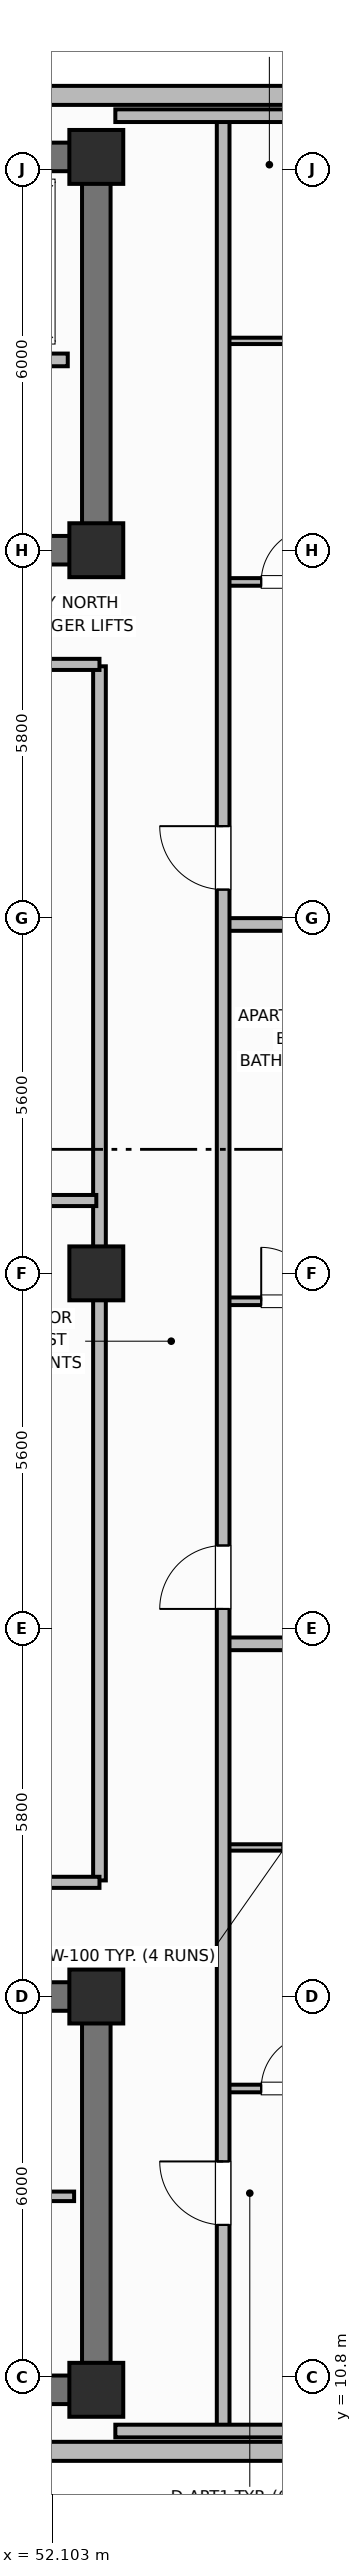
"""IFC4 building model, lengths in metres.
Left out: names, types, materials, properties, quantities, classifications, styles, units other than length and angle.
Written with IfcOpenShell. Run it as: python <this file> out.ifc"""

import sys

from ifc_helpers import new_model, si_unit, direction, frame, frame_2d, origin, origin_2d, place, context, subcontext, project, spatial, rectangle, extrude, element, fill, save


model = new_model("IFC4")
c1 = context("Model", 3, precision=1e-05, world=origin(), true_north=direction((0.0, 1.0)))
c2 = subcontext(c1, "Body", "Model", "MODEL_VIEW")
j1 = project(units=[si_unit("LENGTHUNIT", "METRE"), si_unit("PLANEANGLEUNIT", "RADIAN")], contexts=[c1])
p1 = place(None, origin())
s1 = spatial("IfcSite", under=j1, at=p1, CompositionType="ELEMENT")
p2 = place(p1, origin())
s2 = spatial("IfcBuilding", under=s1, at=p2, CompositionType="ELEMENT")
p3 = place(p2, frame((0.0, 0.0, 236.9)))
s3 = spatial("IfcBuildingStorey", under=s2, at=p3, CompositionType="ELEMENT", Elevation=236.9)
p4 = place(p3, frame((52.8, 10.6, 0.0), z_axis=(0.0, 0.0, 1.0), x_axis=(-1.0, 0.0, 0.0)))
e1 = element("IfcWall", 1, at=p4, inside=s3, PredefinedType="SHEAR", context=c2, shape_type="SweptSolid", body=[
    extrude(rectangle(XDim=27.2, YDim=0.45, at=frame_2d((13.6, 0.0))), origin(), (0.0, 0.0, 1.0), 3.7),
])
p5 = place(p3, frame((52.8, 10.825, 0.0), z_axis=(0.0, 0.0, 1.0), x_axis=(0.0, 1.0, 0.0)))
e2 = element("IfcWall", 2, at=p5, inside=s3, PredefinedType="SHEAR", context=c2, shape_type="SweptSolid", body=[
    extrude(rectangle(XDim=5.75, YDim=0.45, at=frame_2d((2.875, 0.0))), origin(), (0.0, 0.0, 1.0), 3.7),
])
p6 = place(p3, frame((25.6, 16.8, 0.0), z_axis=(0.0, 0.0, 1.0), x_axis=(1.0, 0.0, 0.0)))
e3 = element("IfcWall", 3, at=p6, inside=s3, PredefinedType="SHEAR", context=c2, shape_type="SweptSolid", body=[
    extrude(rectangle(XDim=27.2, YDim=0.45, at=frame_2d((13.6, 0.0))), origin(), (0.0, 0.0, 1.0), 3.7),
])
p7 = place(p6, frame((1.7, 0.0, 0.0)))
e4 = element("IfcOpeningElement", 4, at=p7, cuts=e3, PredefinedType="OPENING", context=c2, shape_type="SweptSolid", body=[
    extrude(rectangle(XDim=1.1, YDim=2.15, at=frame_2d((0.55, 1.075))), frame((0.0, 0.235, 0.0), z_axis=(0.0, -1.0, 0.0), x_axis=(1.0, 0.0, 0.0)), (0.0, 0.0, 1.0), 0.47),
])
p8 = place(p6, frame((4.45, 0.0, 0.0)))
e5 = element("IfcOpeningElement", 5, at=p8, cuts=e3, PredefinedType="OPENING", context=c2, shape_type="SweptSolid", body=[
    extrude(rectangle(XDim=0.85, YDim=2.1, at=frame_2d((0.425, 1.05))), frame((0.0, 0.235, 0.0), z_axis=(0.0, -1.0, 0.0), x_axis=(1.0, 0.0, 0.0)), (0.0, 0.0, 1.0), 0.47),
])
p9 = place(p6, frame((6.5, 0.0, 0.0)))
e6 = element("IfcOpeningElement", 6, at=p9, cuts=e3, PredefinedType="OPENING", context=c2, shape_type="SweptSolid", body=[
    extrude(rectangle(XDim=0.85, YDim=2.1, at=frame_2d((0.425, 1.05))), frame((0.0, 0.235, 0.0), z_axis=(0.0, -1.0, 0.0), x_axis=(1.0, 0.0, 0.0)), (0.0, 0.0, 1.0), 0.47),
])
p10 = place(p6, frame((13.0, 0.0, 0.0)))
e7 = element("IfcOpeningElement", 7, at=p10, cuts=e3, PredefinedType="OPENING", context=c2, shape_type="SweptSolid", body=[
    extrude(rectangle(XDim=1.2, YDim=2.15, at=frame_2d((0.6, 1.075))), frame((0.0, 0.235, 0.0), z_axis=(0.0, -1.0, 0.0), x_axis=(1.0, 0.0, 0.0)), (0.0, 0.0, 1.0), 0.47),
])
p11 = place(p6, frame((19.8, 0.0, 0.0)))
e8 = element("IfcOpeningElement", 8, at=p11, cuts=e3, PredefinedType="OPENING", context=c2, shape_type="SweptSolid", body=[
    extrude(rectangle(XDim=0.85, YDim=2.1, at=frame_2d((0.425, 1.05))), frame((0.0, 0.235, 0.0), z_axis=(0.0, -1.0, 0.0), x_axis=(1.0, 0.0, 0.0)), (0.0, 0.0, 1.0), 0.47),
])
p12 = place(p6, frame((24.2, 0.0, 0.0)))
e9 = element("IfcOpeningElement", 9, at=p12, cuts=e3, PredefinedType="OPENING", context=c2, shape_type="SweptSolid", body=[
    extrude(rectangle(XDim=0.85, YDim=2.1, at=frame_2d((0.425, 1.05))), frame((0.0, 0.235, 0.0), z_axis=(0.0, -1.0, 0.0), x_axis=(1.0, 0.0, 0.0)), (0.0, 0.0, 1.0), 0.47),
])
p13 = place(p3, frame((25.6, 45.8, 0.0), z_axis=(0.0, 0.0, 1.0), x_axis=(1.0, 0.0, 0.0)))
e10 = element("IfcWall", 10, at=p13, inside=s3, PredefinedType="SHEAR", context=c2, shape_type="SweptSolid", body=[
    extrude(rectangle(XDim=27.2, YDim=0.45, at=frame_2d((13.6, 0.0))), origin(), (0.0, 0.0, 1.0), 3.7),
])
p14 = place(p3, frame((52.8, 39.825, 0.0), z_axis=(0.0, 0.0, 1.0), x_axis=(0.0, 1.0, 0.0)))
e11 = element("IfcWall", 11, at=p14, inside=s3, PredefinedType="SHEAR", context=c2, shape_type="SweptSolid", body=[
    extrude(rectangle(XDim=5.75, YDim=0.45, at=frame_2d((2.875, 0.0))), origin(), (0.0, 0.0, 1.0), 3.7),
])
p15 = place(p3, frame((52.8, 39.6, 0.0), z_axis=(0.0, 0.0, 1.0), x_axis=(-1.0, 0.0, 0.0)))
e12 = element("IfcWall", 12, at=p15, inside=s3, PredefinedType="SHEAR", context=c2, shape_type="SweptSolid", body=[
    extrude(rectangle(XDim=27.2, YDim=0.45, at=frame_2d((13.6, 0.0))), origin(), (0.0, 0.0, 1.0), 3.7),
])
p16 = place(p15, frame((24.3, 0.0, 0.0)))
e13 = element("IfcOpeningElement", 13, at=p16, cuts=e12, PredefinedType="OPENING", context=c2, shape_type="SweptSolid", body=[
    extrude(rectangle(XDim=1.1, YDim=2.15, at=frame_2d((0.55, 1.075))), frame((0.0, 0.235, 0.0), z_axis=(0.0, -1.0, 0.0), x_axis=(1.0, 0.0, 0.0)), (0.0, 0.0, 1.0), 0.47),
])
p17 = place(p15, frame((21.85, 0.0, 0.0)))
e14 = element("IfcOpeningElement", 14, at=p17, cuts=e12, PredefinedType="OPENING", context=c2, shape_type="SweptSolid", body=[
    extrude(rectangle(XDim=0.85, YDim=2.1, at=frame_2d((0.425, 1.05))), frame((0.0, 0.235, 0.0), z_axis=(0.0, -1.0, 0.0), x_axis=(1.0, 0.0, 0.0)), (0.0, 0.0, 1.0), 0.47),
])
p18 = place(p15, frame((19.85, 0.0, 0.0)))
e15 = element("IfcOpeningElement", 15, at=p18, cuts=e12, PredefinedType="OPENING", context=c2, shape_type="SweptSolid", body=[
    extrude(rectangle(XDim=0.85, YDim=2.1, at=frame_2d((0.425, 1.05))), frame((0.0, 0.235, 0.0), z_axis=(0.0, -1.0, 0.0), x_axis=(1.0, 0.0, 0.0)), (0.0, 0.0, 1.0), 0.47),
])
p19 = place(p15, frame((15.1, 0.0, 0.0)))
e16 = element("IfcOpeningElement", 16, at=p19, cuts=e12, PredefinedType="OPENING", context=c2, shape_type="SweptSolid", body=[
    extrude(rectangle(XDim=1.2, YDim=2.15, at=frame_2d((0.6, 1.075))), frame((0.0, 0.235, 0.0), z_axis=(0.0, -1.0, 0.0), x_axis=(1.0, 0.0, 0.0)), (0.0, 0.0, 1.0), 0.47),
])
p20 = place(p15, frame((12.6, 0.0, 0.0)))
e17 = element("IfcOpeningElement", 17, at=p20, cuts=e12, PredefinedType="OPENING", context=c2, shape_type="SweptSolid", body=[
    extrude(rectangle(XDim=0.85, YDim=2.1, at=frame_2d((0.425, 1.05))), frame((0.0, 0.235, 0.0), z_axis=(0.0, -1.0, 0.0), x_axis=(1.0, 0.0, 0.0)), (0.0, 0.0, 1.0), 0.47),
])
p21 = place(p15, frame((10.85, 0.0, 0.0)))
e18 = element("IfcOpeningElement", 18, at=p21, cuts=e12, PredefinedType="OPENING", context=c2, shape_type="SweptSolid", body=[
    extrude(rectangle(XDim=0.85, YDim=2.1, at=frame_2d((0.425, 1.05))), frame((0.0, 0.235, 0.0), z_axis=(0.0, -1.0, 0.0), x_axis=(1.0, 0.0, 0.0)), (0.0, 0.0, 1.0), 0.47),
])
p22 = place(p15, frame((7.35, 0.0, 0.0)))
e19 = element("IfcOpeningElement", 19, at=p22, cuts=e12, PredefinedType="OPENING", context=c2, shape_type="SweptSolid", body=[
    extrude(rectangle(XDim=0.85, YDim=2.1, at=frame_2d((0.425, 1.05))), frame((0.0, 0.235, 0.0), z_axis=(0.0, -1.0, 0.0), x_axis=(1.0, 0.0, 0.0)), (0.0, 0.0, 1.0), 0.47),
])
p23 = place(p15, frame((4.2, 0.0, 0.0)))
e20 = element("IfcOpeningElement", 20, at=p23, cuts=e12, PredefinedType="OPENING", context=c2, shape_type="SweptSolid", body=[
    extrude(rectangle(XDim=1.3, YDim=2.2, at=frame_2d((0.65, 1.1))), frame((0.0, 0.235, 0.0), z_axis=(0.0, -1.0, 0.0), x_axis=(1.0, 0.0, 0.0)), (0.0, 0.0, 1.0), 0.47),
])
for number, where, z_axis, x_axis in (
    (21, (52.8, 10.6, 0.0), (0.0, 0.0, 1.0), (1.0, 0.0, 0.0)),
    (22, (52.8, 16.8, 0.0), (0.0, 0.0, 1.0), (1.0, 0.0, 0.0)),
    (23, (52.8, 39.6, 0.0), (0.0, 0.0, 1.0), (1.0, 0.0, 0.0)),
    (24, (52.8, 45.8, 0.0), (0.0, 0.0, 1.0), (1.0, 0.0, 0.0)),
    (25, (52.8, 28.2, 0.0), (0.0, 0.0, 1.0), (1.0, 0.0, 0.0)),
):
    element("IfcColumn", number, at=place(p3, frame(where, z_axis=z_axis, x_axis=x_axis)), inside=s3, PredefinedType="COLUMN", context=c2, shape_type="SweptSolid", body=[
        extrude(rectangle(XDim=0.85, YDim=0.85, at=origin_2d()), origin(), (0.0, 0.0, 1.0), 3.7),
    ])
p24 = place(p3, frame((30.61, 9.63, 0.0), z_axis=(0.0, 0.0, 1.0), x_axis=(1.0, 0.0, 0.0)))
e26 = element("IfcWall", 26, at=p24, inside=s3, PredefinedType="SOLIDWALL", context=c2, shape_type="SweptSolid", body=[
    extrude(rectangle(XDim=25.23, YDim=0.3, at=frame_2d((12.615, 0.0))), origin(), (0.0, 0.0, 1.0), 2.73),
])
p25 = place(p24, frame((0.894, 0.0, 0.71)))
e27 = element("IfcOpeningElement", 27, at=p25, cuts=e26, PredefinedType="OPENING", context=c2, shape_type="SweptSolid", body=[
    extrude(rectangle(XDim=2.1, YDim=1.9, at=frame_2d((1.05, 0.95))), frame((0.0, 0.16, 0.0), z_axis=(0.0, -1.0, 0.0), x_axis=(1.0, 0.0, 0.0)), (0.0, 0.0, 1.0), 0.32),
])
p26 = place(p24, frame((5.933, 0.0, 0.71)))
e28 = element("IfcOpeningElement", 28, at=p26, cuts=e26, PredefinedType="OPENING", context=c2, shape_type="SweptSolid", body=[
    extrude(rectangle(XDim=2.1, YDim=1.9, at=frame_2d((1.05, 0.95))), frame((0.0, 0.16, 0.0), z_axis=(0.0, -1.0, 0.0), x_axis=(1.0, 0.0, 0.0)), (0.0, 0.0, 1.0), 0.32),
])
p27 = place(p24, frame((9.221, 0.0, 0.71)))
e29 = element("IfcOpeningElement", 29, at=p27, cuts=e26, PredefinedType="OPENING", context=c2, shape_type="SweptSolid", body=[
    extrude(rectangle(XDim=2.1, YDim=1.9, at=frame_2d((1.05, 0.95))), frame((0.0, 0.16, 0.0), z_axis=(0.0, -1.0, 0.0), x_axis=(1.0, 0.0, 0.0)), (0.0, 0.0, 1.0), 0.32),
])
p28 = place(p24, frame((13.909, 0.0, 0.71)))
e30 = element("IfcOpeningElement", 30, at=p28, cuts=e26, PredefinedType="OPENING", context=c2, shape_type="SweptSolid", body=[
    extrude(rectangle(XDim=2.1, YDim=1.9, at=frame_2d((1.05, 0.95))), frame((0.0, 0.16, 0.0), z_axis=(0.0, -1.0, 0.0), x_axis=(1.0, 0.0, 0.0)), (0.0, 0.0, 1.0), 0.32),
])
p29 = place(p24, frame((17.548, 0.0, 0.71)))
e31 = element("IfcOpeningElement", 31, at=p29, cuts=e26, PredefinedType="OPENING", context=c2, shape_type="SweptSolid", body=[
    extrude(rectangle(XDim=2.1, YDim=1.9, at=frame_2d((1.05, 0.95))), frame((0.0, 0.16, 0.0), z_axis=(0.0, -1.0, 0.0), x_axis=(1.0, 0.0, 0.0)), (0.0, 0.0, 1.0), 0.32),
])
p30 = place(p3, frame((55.84, 46.77, 0.0), z_axis=(0.0, 0.0, 1.0), x_axis=(-1.0, 0.0, 0.0)))
e32 = element("IfcWall", 32, at=p30, inside=s3, PredefinedType="SOLIDWALL", context=c2, shape_type="SweptSolid", body=[
    extrude(rectangle(XDim=4.45, YDim=0.3, at=frame_2d((2.225, 0.0))), origin(), (0.0, 0.0, 1.0), 2.73),
])
p31 = place(p3, frame((48.05, 13.65, 0.0), z_axis=(0.0, 0.0, 1.0), x_axis=(1.0, 0.0, 0.0)))
e33 = element("IfcWall", 33, at=p31, inside=s3, PredefinedType="PARTITIONING", context=c2, shape_type="SweptSolid", body=[
    extrude(rectangle(XDim=4.4, YDim=0.15, at=frame_2d((2.2, 0.0))), origin(), (0.0, 0.0, 1.0), 2.56),
])
p32 = place(p31, frame((1.6, 0.0, 0.0)))
e34 = element("IfcOpeningElement", 34, at=p32, cuts=e33, PredefinedType="OPENING", context=c2, shape_type="SweptSolid", body=[
    extrude(rectangle(XDim=0.85, YDim=2.1, at=frame_2d((0.425, 1.05))), frame((0.0, 0.085, 0.0), z_axis=(0.0, -1.0, 0.0), x_axis=(1.0, 0.0, 0.0)), (0.0, 0.0, 1.0), 0.17),
])
p33 = place(p3, frame((52.35, 42.6, 0.0), z_axis=(0.0, 0.0, 1.0), x_axis=(-1.0, 0.0, 0.0)))
e35 = element("IfcWall", 35, at=p33, inside=s3, PredefinedType="PARTITIONING", context=c2, shape_type="SweptSolid", body=[
    extrude(rectangle(XDim=6.5, YDim=0.2, at=frame_2d((3.25, 0.0))), origin(), (0.0, 0.0, 1.0), 2.56),
])
p34 = place(p33, frame((4.9, 0.0, 0.0)))
e36 = element("IfcOpeningElement", 36, at=p34, cuts=e35, PredefinedType="OPENING", context=c2, shape_type="SweptSolid", body=[
    extrude(rectangle(XDim=1.0, YDim=2.15, at=frame_2d((0.5, 1.075))), frame((0.0, 0.11, 0.0), z_axis=(0.0, -1.0, 0.0), x_axis=(1.0, 0.0, 0.0)), (0.0, 0.0, 1.0), 0.22),
])
p35 = place(p33, frame((2.8, 0.0, 0.0)))
e37 = element("IfcOpeningElement", 37, at=p35, cuts=e35, PredefinedType="OPENING", context=c2, shape_type="SweptSolid", body=[
    extrude(rectangle(XDim=1.0, YDim=2.15, at=frame_2d((0.5, 1.075))), frame((0.0, 0.11, 0.0), z_axis=(0.0, -1.0, 0.0), x_axis=(1.0, 0.0, 0.0)), (0.0, 0.0, 1.0), 0.22),
])
p36 = place(p33, frame((0.7, 0.0, 0.0)))
e38 = element("IfcOpeningElement", 38, at=p36, cuts=e35, PredefinedType="OPENING", context=c2, shape_type="SweptSolid", body=[
    extrude(rectangle(XDim=1.0, YDim=2.15, at=frame_2d((0.5, 1.075))), frame((0.0, 0.11, 0.0), z_axis=(0.0, -1.0, 0.0), x_axis=(1.0, 0.0, 0.0)), (0.0, 0.0, 1.0), 0.22),
])
p37 = place(p3, frame((52.85, 18.63, 0.0), z_axis=(0.0, 0.0, 1.0), x_axis=(0.0, 1.0, 0.0)))
e39 = element("IfcWall", 39, at=p37, inside=s3, PredefinedType="PARTITIONING", context=c2, shape_type="SweptSolid", body=[
    extrude(rectangle(XDim=19.14, YDim=0.2, at=frame_2d((9.57, 0.0))), origin(), (0.0, 0.0, 1.0), 2.56),
])
for number, where, z_axis, x_axis in (
    (40, (30.7, 18.6, 0.0), (0.0, 0.0, 1.0), (1.0, 0.0, 0.0)),
    (41, (30.7, 37.8, 0.0), (0.0, 0.0, 1.0), (1.0, 0.0, 0.0)),
):
    element("IfcWall", number, at=place(p3, frame(where, z_axis=z_axis, x_axis=x_axis)), inside=s3, PredefinedType="PARTITIONING", context=c2, shape_type="SweptSolid", body=[
        extrude(rectangle(XDim=22.15, YDim=0.175, at=frame_2d((11.075, 0.0))), origin(), (0.0, 0.0, 1.0), 2.56),
    ])
p38 = place(p3, frame((30.73, 29.348, 0.0), z_axis=(0.0, 0.0, 1.0), x_axis=(1.0, 0.0, 0.0)))
e42 = element("IfcWall", 42, at=p38, inside=s3, PredefinedType="PARTITIONING", context=c2, shape_type="SweptSolid", body=[
    extrude(rectangle(XDim=22.07, YDim=0.175, at=frame_2d((11.035, 0.0))), origin(), (0.0, 0.0, 1.0), 2.56),
])
p39 = place(p3, frame((54.8, 15.35, 0.0), z_axis=(0.0, 0.0, 1.0), x_axis=(1.0, 0.0, 0.0)))
e43 = element("IfcWall", 43, at=p39, inside=s3, PredefinedType="PARTITIONING", context=c2, shape_type="SweptSolid", body=[
    extrude(rectangle(XDim=1.95, YDim=0.12, at=frame_2d((0.975, 0.0))), origin(), (0.0, 0.0, 1.0), 2.56),
])
p40 = place(p39, frame((0.6, 0.0, 0.0)))
e44 = element("IfcOpeningElement", 44, at=p40, cuts=e43, PredefinedType="OPENING", context=c2, shape_type="SweptSolid", body=[
    extrude(rectangle(XDim=0.85, YDim=2.1, at=frame_2d((0.425, 1.05))), frame((0.0, 0.07, 0.0), z_axis=(0.0, -1.0, 0.0), x_axis=(1.0, 0.0, 0.0)), (0.0, 0.0, 1.0), 0.14),
])
p41 = place(p3, frame((54.8, 19.15, 0.0), z_axis=(0.0, 0.0, 1.0), x_axis=(1.0, 0.0, 0.0)))
e45 = element("IfcWall", 45, at=p41, inside=s3, PredefinedType="PARTITIONING", context=c2, shape_type="SweptSolid", body=[
    extrude(rectangle(XDim=1.95, YDim=0.1, at=frame_2d((0.975, 0.0))), origin(), (0.0, 0.0, 1.0), 2.56),
])
p42 = place(p3, frame((54.8, 22.36, 0.0), z_axis=(0.0, 0.0, 1.0), x_axis=(1.0, 0.0, 0.0)))
e46 = element("IfcWall", 46, at=p42, inside=s3, PredefinedType="PARTITIONING", context=c2, shape_type="SweptSolid", body=[
    extrude(rectangle(XDim=4.07, YDim=0.2, at=frame_2d((2.035, 0.0))), origin(), (0.0, 0.0, 1.0), 2.56),
])
p43 = place(p3, frame((54.8, 27.76, 0.0), z_axis=(0.0, 0.0, 1.0), x_axis=(1.0, 0.0, 0.0)))
e47 = element("IfcWall", 47, at=p43, inside=s3, PredefinedType="PARTITIONING", context=c2, shape_type="SweptSolid", body=[
    extrude(rectangle(XDim=1.95, YDim=0.12, at=frame_2d((0.975, 0.0))), origin(), (0.0, 0.0, 1.0), 2.56),
])
p44 = place(p43, frame((0.6, 0.0, 0.0)))
e48 = element("IfcOpeningElement", 48, at=p44, cuts=e47, PredefinedType="OPENING", context=c2, shape_type="SweptSolid", body=[
    extrude(rectangle(XDim=0.85, YDim=2.1, at=frame_2d((0.425, 1.05))), frame((0.0, 0.07, 0.0), z_axis=(0.0, -1.0, 0.0), x_axis=(1.0, 0.0, 0.0)), (0.0, 0.0, 1.0), 0.14),
])
p45 = place(p3, frame((54.8, 33.7, 0.0), z_axis=(0.0, 0.0, 1.0), x_axis=(1.0, 0.0, 0.0)))
e49 = element("IfcWall", 49, at=p45, inside=s3, PredefinedType="PARTITIONING", context=c2, shape_type="SweptSolid", body=[
    extrude(rectangle(XDim=4.07, YDim=0.2, at=frame_2d((2.035, 0.0))), origin(), (0.0, 0.0, 1.0), 2.56),
])
p46 = place(p3, frame((54.8, 39.1, 0.0), z_axis=(0.0, 0.0, 1.0), x_axis=(1.0, 0.0, 0.0)))
e50 = element("IfcWall", 50, at=p46, inside=s3, PredefinedType="PARTITIONING", context=c2, shape_type="SweptSolid", body=[
    extrude(rectangle(XDim=1.95, YDim=0.12, at=frame_2d((0.975, 0.0))), origin(), (0.0, 0.0, 1.0), 2.56),
])
p47 = place(p46, frame((0.6, 0.0, 0.0)))
e51 = element("IfcOpeningElement", 51, at=p47, cuts=e50, PredefinedType="OPENING", context=c2, shape_type="SweptSolid", body=[
    extrude(rectangle(XDim=0.85, YDim=2.1, at=frame_2d((0.425, 1.05))), frame((0.0, 0.07, 0.0), z_axis=(0.0, -1.0, 0.0), x_axis=(1.0, 0.0, 0.0)), (0.0, 0.0, 1.0), 0.14),
])
p48 = place(p3, frame((54.8, 42.9, 0.0), z_axis=(0.0, 0.0, 1.0), x_axis=(1.0, 0.0, 0.0)))
e52 = element("IfcWall", 52, at=p48, inside=s3, PredefinedType="PARTITIONING", context=c2, shape_type="SweptSolid", body=[
    extrude(rectangle(XDim=1.95, YDim=0.1, at=frame_2d((0.975, 0.0))), origin(), (0.0, 0.0, 1.0), 2.56),
])
p49 = place(p3, frame((54.8, 9.95, 0.0), z_axis=(0.0, 0.0, 1.0), x_axis=(0.0, 1.0, 0.0)))
e53 = element("IfcWall", 53, at=p49, inside=s3, PredefinedType="PARTITIONING", context=c2, shape_type="SweptSolid", body=[
    extrude(rectangle(XDim=36.5, YDim=0.2, at=frame_2d((18.25, 0.0))), origin(), (0.0, 0.0, 1.0), 2.56),
])
p50 = place(p49, frame((3.25, 0.0, 0.0)))
e54 = element("IfcOpeningElement", 54, at=p50, cuts=e53, PredefinedType="OPENING", context=c2, shape_type="SweptSolid", body=[
    extrude(rectangle(XDim=1.0, YDim=2.15, at=frame_2d((0.5, 1.075))), frame((0.0, 0.11, 0.0), z_axis=(0.0, -1.0, 0.0), x_axis=(1.0, 0.0, 0.0)), (0.0, 0.0, 1.0), 0.22),
])
p51 = place(p49, frame((12.96, 0.0, 0.0)))
e55 = element("IfcOpeningElement", 55, at=p51, cuts=e53, PredefinedType="OPENING", context=c2, shape_type="SweptSolid", body=[
    extrude(rectangle(XDim=1.0, YDim=2.15, at=frame_2d((0.5, 1.075))), frame((0.0, 0.11, 0.0), z_axis=(0.0, -1.0, 0.0), x_axis=(1.0, 0.0, 0.0)), (0.0, 0.0, 1.0), 0.22),
])
p52 = place(p49, frame((24.3, 0.0, 0.0)))
e56 = element("IfcOpeningElement", 56, at=p52, cuts=e53, PredefinedType="OPENING", context=c2, shape_type="SweptSolid", body=[
    extrude(rectangle(XDim=1.0, YDim=2.15, at=frame_2d((0.5, 1.075))), frame((0.0, 0.11, 0.0), z_axis=(0.0, -1.0, 0.0), x_axis=(1.0, 0.0, 0.0)), (0.0, 0.0, 1.0), 0.22),
])
for number, where, z_axis, x_axis in (
    (57, (53.1, 9.95, 0.0), (0.0, 0.0, 1.0), (1.0, 0.0, 0.0)),
    (58, (53.1, 46.45, 0.0), (0.0, 0.0, 1.0), (1.0, 0.0, 0.0)),
):
    element("IfcWall", number, at=place(p3, frame(where, z_axis=z_axis, x_axis=x_axis)), inside=s3, PredefinedType="PARTITIONING", context=c2, shape_type="SweptSolid", body=[
        extrude(rectangle(XDim=3.754, YDim=0.2, at=frame_2d((1.877, 0.0))), origin(), (0.0, 0.0, 1.0), 2.56),
    ])
p53 = place(p40, origin())
e59 = element("IfcDoor", 59, at=p53, inside=s3, OperationType="SINGLE_SWING_RIGHT", PredefinedType="DOOR", context=c2, shape_type="SweptSolid", body=[
    extrude(rectangle(XDim=0.85, YDim=2.1, at=frame_2d((0.425, 1.05))), frame((0.0, 0.025, 0.0), z_axis=(0.0, -1.0, 0.0), x_axis=(1.0, 0.0, 0.0)), (0.0, 0.0, 1.0), 0.05),
])
fill(e44, e59)
p54 = place(p44, origin())
e60 = element("IfcDoor", 60, at=p54, inside=s3, OperationType="SINGLE_SWING_LEFT", PredefinedType="DOOR", context=c2, shape_type="SweptSolid", body=[
    extrude(rectangle(XDim=0.85, YDim=2.1, at=frame_2d((0.425, 1.05))), frame((0.0, 0.025, 0.0), z_axis=(0.0, -1.0, 0.0), x_axis=(1.0, 0.0, 0.0)), (0.0, 0.0, 1.0), 0.05),
])
fill(e48, e60)
p55 = place(p47, origin())
e61 = element("IfcDoor", 61, at=p55, inside=s3, OperationType="SINGLE_SWING_RIGHT", PredefinedType="DOOR", context=c2, shape_type="SweptSolid", body=[
    extrude(rectangle(XDim=0.85, YDim=2.1, at=frame_2d((0.425, 1.05))), frame((0.0, 0.025, 0.0), z_axis=(0.0, -1.0, 0.0), x_axis=(1.0, 0.0, 0.0)), (0.0, 0.0, 1.0), 0.05),
])
fill(e51, e61)
p56 = place(p50, origin())
e62 = element("IfcDoor", 62, at=p56, inside=s3, OperationType="SINGLE_SWING_RIGHT", PredefinedType="DOOR", context=c2, shape_type="SweptSolid", body=[
    extrude(rectangle(XDim=1.0, YDim=2.15, at=frame_2d((0.5, 1.075))), frame((0.0, 0.025, 0.0), z_axis=(0.0, -1.0, 0.0), x_axis=(1.0, 0.0, 0.0)), (0.0, 0.0, 1.0), 0.05),
])
fill(e54, e62)
p57 = place(p51, origin())
e63 = element("IfcDoor", 63, at=p57, inside=s3, OperationType="SINGLE_SWING_LEFT", PredefinedType="DOOR", context=c2, shape_type="SweptSolid", body=[
    extrude(rectangle(XDim=1.0, YDim=2.15, at=frame_2d((0.5, 1.075))), frame((0.0, 0.025, 0.0), z_axis=(0.0, -1.0, 0.0), x_axis=(1.0, 0.0, 0.0)), (0.0, 0.0, 1.0), 0.05),
])
fill(e55, e63)
p58 = place(p52, origin())
e64 = element("IfcDoor", 64, at=p58, inside=s3, OperationType="SINGLE_SWING_RIGHT", PredefinedType="DOOR", context=c2, shape_type="SweptSolid", body=[
    extrude(rectangle(XDim=1.0, YDim=2.15, at=frame_2d((0.5, 1.075))), frame((0.0, 0.025, 0.0), z_axis=(0.0, -1.0, 0.0), x_axis=(1.0, 0.0, 0.0)), (0.0, 0.0, 1.0), 0.05),
])
fill(e56, e64)
save(model, sys.argv[1])
